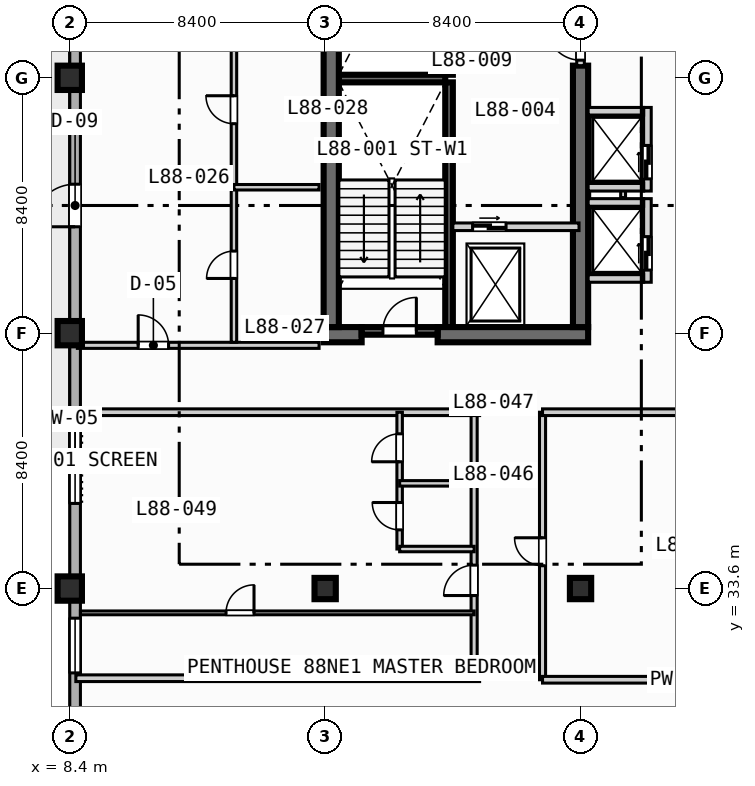
"""IFC4 building model, lengths in metres.
Left out: names, types, materials, properties, quantities, classifications, styles, units other than length and angle.
Written with IfcOpenShell. Run it as: python <this file> out.ifc"""

import sys

from ifc_helpers import new_model, si_unit, direction, frame, frame_2d, origin, origin_2d, place, context, subcontext, project, spatial, rectangle, extrude, element, fill, save


model = new_model("IFC4")
c1 = context("Model", 3, precision=1e-05, world=origin(), true_north=direction((0.0, 1.0)))
c2 = subcontext(c1, "Body", "Model", "MODEL_VIEW")
j1 = project(units=[si_unit("LENGTHUNIT", "METRE"), si_unit("PLANEANGLEUNIT", "RADIAN")], contexts=[c1])
p1 = place(None, origin())
s1 = spatial("IfcSite", under=j1, at=p1, CompositionType="ELEMENT")
p2 = place(p1, origin())
s2 = spatial("IfcBuilding", under=s1, at=p2, CompositionType="ELEMENT")
p3 = place(p2, frame((0.0, 0.0, 355.4)))
s3 = spatial("IfcBuildingStorey", under=s2, at=p3, CompositionType="ELEMENT", Elevation=355.4)
for number, where, z_axis, x_axis in (
    (1, (20.875, 42.2, 0.0), (0.0, 0.0, 1.0), (0.0, 1.0, 0.0)),
    (2, (20.875, 50.5, 0.0), (0.0, 0.0, 1.0), (0.0, 1.0, 0.0)),
):
    element("IfcWall", number, at=place(p3, frame(where, z_axis=z_axis, x_axis=x_axis)), inside=s3, PredefinedType="SOLIDWALL", context=c2, shape_type="SweptSolid", body=[
        extrude(rectangle(XDim=8.05, YDim=0.25, at=frame_2d((4.025, 0.0))), origin(), (0.0, 0.0, 1.0), 3.97),
    ])
p4 = place(p3, frame((17.25, 50.375, 0.0), z_axis=(0.0, 0.0, 1.0), x_axis=(1.0, 0.0, 0.0)))
e3 = element("IfcWall", 3, at=p4, inside=s3, PredefinedType="SOLIDWALL", context=c2, shape_type="SweptSolid", body=[
    extrude(rectangle(XDim=3.5, YDim=0.25, at=frame_2d((1.75, 0.0))), origin(), (0.0, 0.0, 1.0), 3.97),
])
p5 = place(p3, frame((16.75, 41.95, 0.0), z_axis=(0.0, 0.0, 1.0), x_axis=(1.0, 0.0, 0.0)))
e4 = element("IfcWall", 4, at=p5, inside=s3, PredefinedType="SHEAR", context=c2, shape_type="SweptSolid", body=[
    extrude(rectangle(XDim=1.25, YDim=0.5, at=frame_2d((0.625, 0.0))), origin(), (0.0, 0.0, 1.0), 3.97),
])
p6 = place(p3, frame((20.5, 41.95, 0.0), z_axis=(0.0, 0.0, 1.0), x_axis=(1.0, 0.0, 0.0)))
e5 = element("IfcWall", 5, at=p6, inside=s3, PredefinedType="SHEAR", context=c2, shape_type="SweptSolid", body=[
    extrude(rectangle(XDim=4.95, YDim=0.5, at=frame_2d((2.475, 0.0))), origin(), (0.0, 0.0, 1.0), 3.97),
])
p7 = place(p3, frame((17.0, 42.2, 0.0), z_axis=(0.0, 0.0, 1.0), x_axis=(0.0, 1.0, 0.0)))
e6 = element("IfcWall", 6, at=p7, inside=s3, PredefinedType="SHEAR", context=c2, shape_type="SweptSolid", body=[
    extrude(rectangle(XDim=16.35, YDim=0.5, at=frame_2d((8.175, 0.0))), origin(), (0.0, 0.0, 1.0), 3.97),
])
p8 = place(p3, frame((25.2, 42.2, 0.0), z_axis=(0.0, 0.0, 1.0), x_axis=(0.0, 1.0, 0.0)))
e7 = element("IfcWall", 7, at=p8, inside=s3, PredefinedType="SHEAR", context=c2, shape_type="SweptSolid", body=[
    extrude(rectangle(XDim=8.6, YDim=0.5, at=frame_2d((4.3, 0.0))), origin(), (0.0, 0.0, 1.0), 3.97),
])
for number, where, z_axis, x_axis in (
    (8, (8.4, 33.6, 0.0), (0.0, 0.0, 1.0), (1.0, 0.0, 0.0)),
    (9, (8.4, 42.0, 0.0), (0.0, 0.0, 1.0), (1.0, 0.0, 0.0)),
    (10, (8.4, 50.4, 0.0), (0.0, 0.0, 1.0), (1.0, 0.0, 0.0)),
):
    element("IfcColumn", number, at=place(p3, frame(where, z_axis=z_axis, x_axis=x_axis)), inside=s3, PredefinedType="COLUMN", context=c2, shape_type="SweptSolid", body=[
        extrude(rectangle(XDim=0.8, YDim=0.8, at=origin_2d()), origin(), (0.0, 0.0, 1.0), 4.2),
    ])
for number, where, z_axis, x_axis in (
    (11, (16.8, 33.6, 0.0), (0.0, 0.0, 1.0), (1.0, 0.0, 0.0)),
    (12, (25.2, 33.6, 0.0), (0.0, 0.0, 1.0), (1.0, 0.0, 0.0)),
):
    element("IfcColumn", number, at=place(p3, frame(where, z_axis=z_axis, x_axis=x_axis)), inside=s3, PredefinedType="COLUMN", context=c2, shape_type="SweptSolid", body=[
        extrude(rectangle(XDim=0.7, YDim=0.7, at=origin_2d()), origin(), (0.0, 0.0, 1.0), 4.2),
    ])
p9 = place(p3, frame((8.575, 11.575, 0.0), z_axis=(0.0, 0.0, 1.0), x_axis=(0.0, 1.0, 0.0)))
e13 = element("IfcWall", 13, at=p9, inside=s3, PredefinedType="STANDARD", context=c2, shape_type="SweptSolid", body=[
    extrude(rectangle(XDim=60.85, YDim=0.35, at=frame_2d((30.425, 0.0))), origin(), (0.0, 0.0, 1.0), 3.97),
])
p10 = place(p9, frame((33.925, 0.0, 0.0)))
e14 = element("IfcOpeningElement", 14, at=p10, cuts=e13, PredefinedType="OPENING", context=c2, shape_type="SweptSolid", body=[
    extrude(rectangle(XDim=1.4, YDim=2.2, at=frame_2d((0.7, 1.1))), frame((0.0, 0.185, 0.0), z_axis=(0.0, -1.0, 0.0), x_axis=(1.0, 0.0, 0.0)), (0.0, 0.0, 1.0), 0.37),
])
p11 = place(p9, frame((24.825, 0.0, 0.85)))
e15 = element("IfcOpeningElement", 15, at=p11, cuts=e13, PredefinedType="OPENING", context=c2, shape_type="SweptSolid", body=[
    extrude(rectangle(XDim=2.8, YDim=2.1, at=frame_2d((1.4, 1.05))), frame((0.0, 0.185, 0.0), z_axis=(0.0, -1.0, 0.0), x_axis=(1.0, 0.0, 0.0)), (0.0, 0.0, 1.0), 0.37),
])
p12 = place(p9, frame((41.625, 0.0, 0.85)))
e16 = element("IfcOpeningElement", 16, at=p12, cuts=e13, PredefinedType="OPENING", context=c2, shape_type="SweptSolid", body=[
    extrude(rectangle(XDim=2.8, YDim=2.1, at=frame_2d((1.4, 1.05))), frame((0.0, 0.185, 0.0), z_axis=(0.0, -1.0, 0.0), x_axis=(1.0, 0.0, 0.0)), (0.0, 0.0, 1.0), 0.37),
])
p13 = place(p9, frame((19.25, 0.0, 0.85)))
e17 = element("IfcOpeningElement", 17, at=p13, cuts=e13, PredefinedType="OPENING", context=c2, shape_type="SweptSolid", body=[
    extrude(rectangle(XDim=1.8, YDim=1.8, at=frame_2d((0.9, 0.9))), frame((0.0, 0.185, 0.0), z_axis=(0.0, -1.0, 0.0), x_axis=(1.0, 0.0, 0.0)), (0.0, 0.0, 1.0), 0.37),
])
p14 = place(p3, frame((18.0, 42.075, 0.0), z_axis=(0.0, 0.0, 1.0), x_axis=(1.0, 0.0, 0.0)))
e18 = element("IfcWall", 18, at=p14, inside=s3, PredefinedType="SOLIDWALL", context=c2, shape_type="SweptSolid", body=[
    extrude(rectangle(XDim=2.5, YDim=0.25, at=frame_2d((1.25, 0.0))), origin(), (0.0, 0.0, 1.0), 3.97),
])
p15 = place(p14, frame((0.7, 0.0, 0.0)))
e19 = element("IfcOpeningElement", 19, at=p15, cuts=e18, PredefinedType="OPENING", context=c2, shape_type="SweptSolid", body=[
    extrude(rectangle(XDim=1.1, YDim=2.15, at=frame_2d((0.55, 1.075))), frame((0.0, 0.135, 0.0), z_axis=(0.0, -1.0, 0.0), x_axis=(1.0, 0.0, 0.0)), (0.0, 0.0, 1.0), 0.27),
])
p16 = place(p3, frame((21.0, 45.5, 0.0), z_axis=(0.0, 0.0, 1.0), x_axis=(1.0, 0.0, 0.0)))
e20 = element("IfcWall", 20, at=p16, inside=s3, PredefinedType="SOLIDWALL", context=c2, shape_type="SweptSolid", body=[
    extrude(rectangle(XDim=4.15, YDim=0.25, at=frame_2d((2.075, 0.0))), origin(), (0.0, 0.0, 1.0), 3.97),
])
p17 = place(p16, frame((0.65, 0.0, 0.0)))
e21 = element("IfcOpeningElement", 21, at=p17, cuts=e20, PredefinedType="OPENING", context=c2, shape_type="SweptSolid", body=[
    extrude(rectangle(XDim=1.1, YDim=2.15, at=frame_2d((0.55, 1.075))), frame((0.0, 0.135, 0.0), z_axis=(0.0, -1.0, 0.0), x_axis=(1.0, 0.0, 0.0)), (0.0, 0.0, 1.0), 0.27),
])
p18 = place(p3, frame((25.2, 50.8, 0.0), z_axis=(0.0, 0.0, 1.0), x_axis=(0.0, 1.0, 0.0)))
e22 = element("IfcWall", 22, at=p18, inside=s3, PredefinedType="SOLIDWALL", context=c2, shape_type="SweptSolid", body=[
    extrude(rectangle(XDim=1.48, YDim=0.25, at=frame_2d((0.74, 0.0))), origin(), (0.0, 0.0, 1.0), 3.97),
])
p19 = place(p18, frame((0.18, 0.0, 0.0)))
e23 = element("IfcOpeningElement", 23, at=p19, cuts=e22, PredefinedType="OPENING", context=c2, shape_type="SweptSolid", body=[
    extrude(rectangle(XDim=1.1, YDim=2.15, at=frame_2d((0.55, 1.075))), frame((0.0, 0.135, 0.0), z_axis=(0.0, -1.0, 0.0), x_axis=(1.0, 0.0, 0.0)), (0.0, 0.0, 1.0), 0.27),
])
p20 = place(p3, frame((27.4, 43.675, 0.0), z_axis=(0.0, 0.0, 1.0), x_axis=(0.0, 1.0, 0.0)))
e24 = element("IfcWall", 24, at=p20, inside=s3, PredefinedType="SOLIDWALL", context=c2, shape_type="SweptSolid", body=[
    extrude(rectangle(XDim=2.75, YDim=0.25, at=frame_2d((1.375, 0.0))), origin(), (0.0, 0.0, 1.0), 3.97),
])
p21 = place(p20, frame((0.4, 0.0, 0.0)))
e25 = element("IfcOpeningElement", 25, at=p21, cuts=e24, PredefinedType="OPENING", context=c2, shape_type="SweptSolid", body=[
    extrude(rectangle(XDim=1.1, YDim=2.15, at=frame_2d((0.55, 1.075))), frame((0.0, 0.135, 0.0), z_axis=(0.0, -1.0, 0.0), x_axis=(1.0, 0.0, 0.0)), (0.0, 0.0, 1.0), 0.27),
])
for number, where, z_axis, x_axis in (
    (26, (25.45, 43.8, 0.0), (0.0, 0.0, 1.0), (1.0, 0.0, 0.0)),
    (27, (25.45, 46.3, 0.0), (0.0, 0.0, 1.0), (1.0, 0.0, 0.0)),
):
    element("IfcWall", number, at=place(p3, frame(where, z_axis=z_axis, x_axis=x_axis)), inside=s3, PredefinedType="SOLIDWALL", context=c2, shape_type="SweptSolid", body=[
        extrude(rectangle(XDim=1.825, YDim=0.25, at=frame_2d((0.913, 0.0))), origin(), (0.0, 0.0, 1.0), 3.97),
    ])
p22 = place(p3, frame((26.6, 46.46, 0.0), z_axis=(0.0, 0.0, 1.0), x_axis=(0.0, 1.0, 0.0)))
e28 = element("IfcWall", 28, at=p22, inside=s3, PredefinedType="PARTITIONING", context=c2, shape_type="SweptSolid", body=[
    extrude(rectangle(XDim=0.88, YDim=0.16, at=frame_2d((0.44, 0.0))), origin(), (0.0, 0.0, 1.0), 3.97),
])
p23 = place(p3, frame((27.4, 46.675, 0.0), z_axis=(0.0, 0.0, 1.0), x_axis=(0.0, 1.0, 0.0)))
e29 = element("IfcWall", 29, at=p23, inside=s3, PredefinedType="SOLIDWALL", context=c2, shape_type="SweptSolid", body=[
    extrude(rectangle(XDim=2.75, YDim=0.25, at=frame_2d((1.375, 0.0))), origin(), (0.0, 0.0, 1.0), 3.97),
])
p24 = place(p23, frame((0.4, 0.0, 0.0)))
e30 = element("IfcOpeningElement", 30, at=p24, cuts=e29, PredefinedType="OPENING", context=c2, shape_type="SweptSolid", body=[
    extrude(rectangle(XDim=1.1, YDim=2.15, at=frame_2d((0.55, 1.075))), frame((0.0, 0.135, 0.0), z_axis=(0.0, -1.0, 0.0), x_axis=(1.0, 0.0, 0.0)), (0.0, 0.0, 1.0), 0.27),
])
for number, where, z_axis, x_axis in (
    (31, (25.45, 46.8, 0.0), (0.0, 0.0, 1.0), (1.0, 0.0, 0.0)),
    (32, (25.45, 49.3, 0.0), (0.0, 0.0, 1.0), (1.0, 0.0, 0.0)),
):
    element("IfcWall", number, at=place(p3, frame(where, z_axis=z_axis, x_axis=x_axis)), inside=s3, PredefinedType="SOLIDWALL", context=c2, shape_type="SweptSolid", body=[
        extrude(rectangle(XDim=1.825, YDim=0.25, at=frame_2d((0.913, 0.0))), origin(), (0.0, 0.0, 1.0), 3.97),
    ])
p25 = place(p3, frame((23.95, 30.6, 0.0), z_axis=(0.0, 0.0, 1.0), x_axis=(0.0, 1.0, 0.0)))
e33 = element("IfcWall", 33, at=p25, inside=s3, PredefinedType="PARTITIONING", context=c2, shape_type="SweptSolid", body=[
    extrude(rectangle(XDim=8.8, YDim=0.2, at=frame_2d((4.4, 0.0))), origin(), (0.0, 0.0, 1.0), 3.97),
])
p26 = place(p25, frame((3.75, 0.0, 0.0)))
e34 = element("IfcOpeningElement", 34, at=p26, cuts=e33, PredefinedType="OPENING", context=c2, shape_type="SweptSolid", body=[
    extrude(rectangle(XDim=0.92, YDim=2.1, at=frame_2d((0.46, 1.05))), frame((0.0, 0.11, 0.0), z_axis=(0.0, -1.0, 0.0), x_axis=(1.0, 0.0, 0.0)), (0.0, 0.0, 1.0), 0.22),
])
for number, where, z_axis, x_axis in (
    (35, (23.95, 30.6, 0.0), (0.0, 0.0, 1.0), (1.0, 0.0, 0.0)),
    (36, (23.95, 39.4, 0.0), (0.0, 0.0, 1.0), (1.0, 0.0, 0.0)),
):
    element("IfcWall", number, at=place(p3, frame(where, z_axis=z_axis, x_axis=x_axis)), inside=s3, PredefinedType="PARTITIONING", context=c2, shape_type="SweptSolid", body=[
        extrude(rectangle(XDim=9.35, YDim=0.22, at=frame_2d((4.675, 0.0))), origin(), (0.0, 0.0, 1.0), 3.97),
    ])
p27 = place(p3, frame((8.65, 41.6, 0.0), z_axis=(0.0, 0.0, 1.0), x_axis=(1.0, 0.0, 0.0)))
e37 = element("IfcWall", 37, at=p27, inside=s3, PredefinedType="PARTITIONING", context=c2, shape_type="SweptSolid", body=[
    extrude(rectangle(XDim=7.95, YDim=0.2, at=frame_2d((3.975, 0.0))), origin(), (0.0, 0.0, 1.0), 3.97),
])
p28 = place(p27, frame((2.0, 0.0, 0.0)))
e38 = element("IfcOpeningElement", 38, at=p28, cuts=e37, PredefinedType="OPENING", context=c2, shape_type="SweptSolid", body=[
    extrude(rectangle(XDim=1.0, YDim=2.15, at=frame_2d((0.5, 1.075))), frame((0.0, 0.11, 0.0), z_axis=(0.0, -1.0, 0.0), x_axis=(1.0, 0.0, 0.0)), (0.0, 0.0, 1.0), 0.22),
])
p29 = place(p3, frame((13.8, 41.7, 0.0), z_axis=(0.0, 0.0, 1.0), x_axis=(0.0, 1.0, 0.0)))
e39 = element("IfcWall", 39, at=p29, inside=s3, PredefinedType="PLUMBINGWALL", context=c2, shape_type="SweptSolid", body=[
    extrude(rectangle(XDim=10.2, YDim=0.18, at=frame_2d((5.1, 0.0))), origin(), (0.0, 0.0, 1.0), 3.97),
])
p30 = place(p29, frame((2.1, 0.0, 0.0)))
e40 = element("IfcOpeningElement", 40, at=p30, cuts=e39, PredefinedType="OPENING", context=c2, shape_type="SweptSolid", body=[
    extrude(rectangle(XDim=0.9, YDim=2.1, at=frame_2d((0.45, 1.05))), frame((0.0, 0.1, 0.0), z_axis=(0.0, -1.0, 0.0), x_axis=(1.0, 0.0, 0.0)), (0.0, 0.0, 1.0), 0.2),
])
p31 = place(p29, frame((7.19, 0.0, 0.0)))
e41 = element("IfcOpeningElement", 41, at=p31, cuts=e39, PredefinedType="OPENING", context=c2, shape_type="SweptSolid", body=[
    extrude(rectangle(XDim=0.92, YDim=2.1, at=frame_2d((0.46, 1.05))), frame((0.0, 0.1, 0.0), z_axis=(0.0, -1.0, 0.0), x_axis=(1.0, 0.0, 0.0)), (0.0, 0.0, 1.0), 0.2),
])
p32 = place(p3, frame((13.8, 46.8, 0.0), z_axis=(0.0, 0.0, 1.0), x_axis=(1.0, 0.0, 0.0)))
e42 = element("IfcWall", 42, at=p32, inside=s3, PredefinedType="PLUMBINGWALL", context=c2, shape_type="SweptSolid", body=[
    extrude(rectangle(XDim=2.8, YDim=0.18, at=frame_2d((1.4, 0.0))), origin(), (0.0, 0.0, 1.0), 3.97),
])
p33 = place(p3, frame((21.7, 30.65, 0.0), z_axis=(0.0, 0.0, 1.0), x_axis=(0.0, 1.0, 0.0)))
e43 = element("IfcWall", 43, at=p33, inside=s3, PredefinedType="PARTITIONING", context=c2, shape_type="SweptSolid", body=[
    extrude(rectangle(XDim=8.75, YDim=0.2, at=frame_2d((4.375, 0.0))), origin(), (0.0, 0.0, 1.0), 3.97),
])
p34 = place(p33, frame((2.72, 0.0, 0.0)))
e44 = element("IfcOpeningElement", 44, at=p34, cuts=e43, PredefinedType="OPENING", context=c2, shape_type="SweptSolid", body=[
    extrude(rectangle(XDim=1.0, YDim=2.15, at=frame_2d((0.5, 1.075))), frame((0.0, 0.11, 0.0), z_axis=(0.0, -1.0, 0.0), x_axis=(1.0, 0.0, 0.0)), (0.0, 0.0, 1.0), 0.22),
])
for number, where, z_axis, x_axis in (
    (45, (8.6, 30.65, 0.0), (0.0, 0.0, 1.0), (1.0, 0.0, 0.0)),
    (46, (8.6, 39.4, 0.0), (0.0, 0.0, 1.0), (1.0, 0.0, 0.0)),
):
    element("IfcWall", number, at=place(p3, frame(where, z_axis=z_axis, x_axis=x_axis)), inside=s3, PredefinedType="PARTITIONING", context=c2, shape_type="SweptSolid", body=[
        extrude(rectangle(XDim=13.28, YDim=0.22, at=frame_2d((6.64, 0.0))), origin(), (0.0, 0.0, 1.0), 3.97),
    ])
p35 = place(p3, frame((19.25, 34.9, 0.0), z_axis=(0.0, 0.0, 1.0), x_axis=(0.0, 1.0, 0.0)))
e47 = element("IfcWall", 47, at=p35, inside=s3, PredefinedType="PLUMBINGWALL", context=c2, shape_type="SweptSolid", body=[
    extrude(rectangle(XDim=4.5, YDim=0.18, at=frame_2d((2.25, 0.0))), origin(), (0.0, 0.0, 1.0), 3.97),
])
p36 = place(p35, frame((0.63, 0.0, 0.0)))
e48 = element("IfcOpeningElement", 48, at=p36, cuts=e47, PredefinedType="OPENING", context=c2, shape_type="SweptSolid", body=[
    extrude(rectangle(XDim=0.9, YDim=2.1, at=frame_2d((0.45, 1.05))), frame((0.0, 0.1, 0.0), z_axis=(0.0, -1.0, 0.0), x_axis=(1.0, 0.0, 0.0)), (0.0, 0.0, 1.0), 0.2),
])
p37 = place(p35, frame((2.87, 0.0, 0.0)))
e49 = element("IfcOpeningElement", 49, at=p37, cuts=e47, PredefinedType="OPENING", context=c2, shape_type="SweptSolid", body=[
    extrude(rectangle(XDim=0.92, YDim=2.1, at=frame_2d((0.46, 1.05))), frame((0.0, 0.1, 0.0), z_axis=(0.0, -1.0, 0.0), x_axis=(1.0, 0.0, 0.0)), (0.0, 0.0, 1.0), 0.2),
])
for number, where, z_axis, x_axis in (
    (50, (19.25, 34.9, 0.0), (0.0, 0.0, 1.0), (1.0, 0.0, 0.0)),
    (51, (19.25, 37.06, 0.0), (0.0, 0.0, 1.0), (1.0, 0.0, 0.0)),
):
    element("IfcWall", number, at=place(p3, frame(where, z_axis=z_axis, x_axis=x_axis)), inside=s3, PredefinedType="PLUMBINGWALL", context=c2, shape_type="SweptSolid", body=[
        extrude(rectangle(XDim=2.45, YDim=0.18, at=frame_2d((1.225, 0.0))), origin(), (0.0, 0.0, 1.0), 3.97),
    ])
p38 = place(p3, frame((8.75, 32.8, 0.0), z_axis=(0.0, 0.0, 1.0), x_axis=(1.0, 0.0, 0.0)))
e52 = element("IfcWall", 52, at=p38, inside=s3, PredefinedType="PARTITIONING", context=c2, shape_type="SweptSolid", body=[
    extrude(rectangle(XDim=12.95, YDim=0.125, at=frame_2d((6.475, 0.0))), origin(), (0.0, 0.0, 1.0), 3.97),
])
p39 = place(p38, frame((4.79, 0.0, 0.0)))
e53 = element("IfcOpeningElement", 53, at=p39, cuts=e52, PredefinedType="OPENING", context=c2, shape_type="SweptSolid", body=[
    extrude(rectangle(XDim=0.92, YDim=2.1, at=frame_2d((0.46, 1.05))), frame((0.0, 0.073, 0.0), z_axis=(0.0, -1.0, 0.0), x_axis=(1.0, 0.0, 0.0)), (0.0, 0.0, 1.0), 0.145),
])
p40 = place(p10, origin())
e54 = element("IfcDoor", 54, at=p40, inside=s3, OperationType="SINGLE_SWING_LEFT", PredefinedType="DOOR", context=c2, shape_type="SweptSolid", body=[
    extrude(rectangle(XDim=1.4, YDim=2.2, at=frame_2d((0.7, 1.1))), frame((0.0, 0.025, 0.0), z_axis=(0.0, -1.0, 0.0), x_axis=(1.0, 0.0, 0.0)), (0.0, 0.0, 1.0), 0.05),
])
fill(e14, e54)
p41 = place(p11, origin())
e55 = element("IfcWindow", 55, at=p41, inside=s3, PartitioningType="SINGLE_PANEL", PredefinedType="WINDOW", context=c2, shape_type="SweptSolid", body=[
    extrude(rectangle(XDim=2.8, YDim=2.1, at=frame_2d((1.4, 1.05))), frame((0.0, 0.03, 0.0), z_axis=(0.0, -1.0, 0.0), x_axis=(1.0, 0.0, 0.0)), (0.0, 0.0, 1.0), 0.06),
])
fill(e15, e55)
p42 = place(p13, origin())
e56 = element("IfcWindow", 56, at=p42, inside=s3, PartitioningType="SINGLE_PANEL", PredefinedType="WINDOW", context=c2, shape_type="SweptSolid", body=[
    extrude(rectangle(XDim=1.8, YDim=1.8, at=frame_2d((0.9, 0.9))), frame((0.0, 0.03, 0.0), z_axis=(0.0, -1.0, 0.0), x_axis=(1.0, 0.0, 0.0)), (0.0, 0.0, 1.0), 0.06),
])
fill(e17, e56)
p43 = place(p15, origin())
e57 = element("IfcDoor", 57, at=p43, inside=s3, OperationType="SINGLE_SWING_RIGHT", PredefinedType="DOOR", context=c2, shape_type="SweptSolid", body=[
    extrude(rectangle(XDim=1.1, YDim=2.15, at=frame_2d((0.55, 1.075))), frame((0.0, 0.025, 0.0), z_axis=(0.0, -1.0, 0.0), x_axis=(1.0, 0.0, 0.0)), (0.0, 0.0, 1.0), 0.05),
])
fill(e19, e57)
p44 = place(p17, origin())
e58 = element("IfcDoor", 58, at=p44, inside=s3, OperationType="SLIDING_TO_LEFT", PredefinedType="DOOR", context=c2, shape_type="SweptSolid", body=[
    extrude(rectangle(XDim=1.1, YDim=2.15, at=frame_2d((0.55, 1.075))), frame((0.0, 0.025, 0.0), z_axis=(0.0, -1.0, 0.0), x_axis=(1.0, 0.0, 0.0)), (0.0, 0.0, 1.0), 0.05),
])
fill(e21, e58)
p45 = place(p19, origin())
e59 = element("IfcDoor", 59, at=p45, inside=s3, OperationType="SINGLE_SWING_RIGHT", PredefinedType="DOOR", context=c2, shape_type="SweptSolid", body=[
    extrude(rectangle(XDim=1.1, YDim=2.15, at=frame_2d((0.55, 1.075))), frame((0.0, 0.025, 0.0), z_axis=(0.0, -1.0, 0.0), x_axis=(1.0, 0.0, 0.0)), (0.0, 0.0, 1.0), 0.05),
])
fill(e23, e59)
p46 = place(p21, origin())
e60 = element("IfcDoor", 60, at=p46, inside=s3, OperationType="SLIDING_TO_LEFT", PredefinedType="DOOR", context=c2, shape_type="SweptSolid", body=[
    extrude(rectangle(XDim=1.1, YDim=2.15, at=frame_2d((0.55, 1.075))), frame((0.0, 0.025, 0.0), z_axis=(0.0, -1.0, 0.0), x_axis=(1.0, 0.0, 0.0)), (0.0, 0.0, 1.0), 0.05),
])
fill(e25, e60)
p47 = place(p24, origin())
e61 = element("IfcDoor", 61, at=p47, inside=s3, OperationType="SLIDING_TO_LEFT", PredefinedType="DOOR", context=c2, shape_type="SweptSolid", body=[
    extrude(rectangle(XDim=1.1, YDim=2.15, at=frame_2d((0.55, 1.075))), frame((0.0, 0.025, 0.0), z_axis=(0.0, -1.0, 0.0), x_axis=(1.0, 0.0, 0.0)), (0.0, 0.0, 1.0), 0.05),
])
fill(e30, e61)
p48 = place(p26, origin())
e62 = element("IfcDoor", 62, at=p48, inside=s3, OperationType="SINGLE_SWING_RIGHT", PredefinedType="DOOR", context=c2, shape_type="SweptSolid", body=[
    extrude(rectangle(XDim=0.92, YDim=2.1, at=frame_2d((0.46, 1.05))), frame((0.0, 0.025, 0.0), z_axis=(0.0, -1.0, 0.0), x_axis=(1.0, 0.0, 0.0)), (0.0, 0.0, 1.0), 0.05),
])
fill(e34, e62)
p49 = place(p28, origin())
e63 = element("IfcDoor", 63, at=p49, inside=s3, OperationType="SINGLE_SWING_LEFT", PredefinedType="DOOR", context=c2, shape_type="SweptSolid", body=[
    extrude(rectangle(XDim=1.0, YDim=2.15, at=frame_2d((0.5, 1.075))), frame((0.0, 0.025, 0.0), z_axis=(0.0, -1.0, 0.0), x_axis=(1.0, 0.0, 0.0)), (0.0, 0.0, 1.0), 0.05),
])
fill(e38, e63)
p50 = place(p30, origin())
e64 = element("IfcDoor", 64, at=p50, inside=s3, OperationType="SINGLE_SWING_LEFT", PredefinedType="DOOR", context=c2, shape_type="SweptSolid", body=[
    extrude(rectangle(XDim=0.9, YDim=2.1, at=frame_2d((0.45, 1.05))), frame((0.0, 0.025, 0.0), z_axis=(0.0, -1.0, 0.0), x_axis=(1.0, 0.0, 0.0)), (0.0, 0.0, 1.0), 0.05),
])
fill(e40, e64)
p51 = place(p31, origin())
e65 = element("IfcDoor", 65, at=p51, inside=s3, OperationType="SINGLE_SWING_RIGHT", PredefinedType="DOOR", context=c2, shape_type="SweptSolid", body=[
    extrude(rectangle(XDim=0.92, YDim=2.1, at=frame_2d((0.46, 1.05))), frame((0.0, 0.025, 0.0), z_axis=(0.0, -1.0, 0.0), x_axis=(1.0, 0.0, 0.0)), (0.0, 0.0, 1.0), 0.05),
])
fill(e41, e65)
p52 = place(p34, origin())
e66 = element("IfcDoor", 66, at=p52, inside=s3, OperationType="SINGLE_SWING_LEFT", PredefinedType="DOOR", context=c2, shape_type="SweptSolid", body=[
    extrude(rectangle(XDim=1.0, YDim=2.15, at=frame_2d((0.5, 1.075))), frame((0.0, 0.025, 0.0), z_axis=(0.0, -1.0, 0.0), x_axis=(1.0, 0.0, 0.0)), (0.0, 0.0, 1.0), 0.05),
])
fill(e44, e66)
p53 = place(p36, origin())
e67 = element("IfcDoor", 67, at=p53, inside=s3, OperationType="SINGLE_SWING_RIGHT", PredefinedType="DOOR", context=c2, shape_type="SweptSolid", body=[
    extrude(rectangle(XDim=0.9, YDim=2.1, at=frame_2d((0.45, 1.05))), frame((0.0, 0.025, 0.0), z_axis=(0.0, -1.0, 0.0), x_axis=(1.0, 0.0, 0.0)), (0.0, 0.0, 1.0), 0.05),
])
fill(e48, e67)
p54 = place(p37, origin())
e68 = element("IfcDoor", 68, at=p54, inside=s3, OperationType="SINGLE_SWING_LEFT", PredefinedType="DOOR", context=c2, shape_type="SweptSolid", body=[
    extrude(rectangle(XDim=0.92, YDim=2.1, at=frame_2d((0.46, 1.05))), frame((0.0, 0.025, 0.0), z_axis=(0.0, -1.0, 0.0), x_axis=(1.0, 0.0, 0.0)), (0.0, 0.0, 1.0), 0.05),
])
fill(e49, e68)
p55 = place(p39, origin())
e69 = element("IfcDoor", 69, at=p55, inside=s3, OperationType="SINGLE_SWING_RIGHT", PredefinedType="DOOR", context=c2, shape_type="SweptSolid", body=[
    extrude(rectangle(XDim=0.92, YDim=2.1, at=frame_2d((0.46, 1.05))), frame((0.0, 0.025, 0.0), z_axis=(0.0, -1.0, 0.0), x_axis=(1.0, 0.0, 0.0)), (0.0, 0.0, 1.0), 0.05),
])
fill(e53, e69)
save(model, sys.argv[1])
